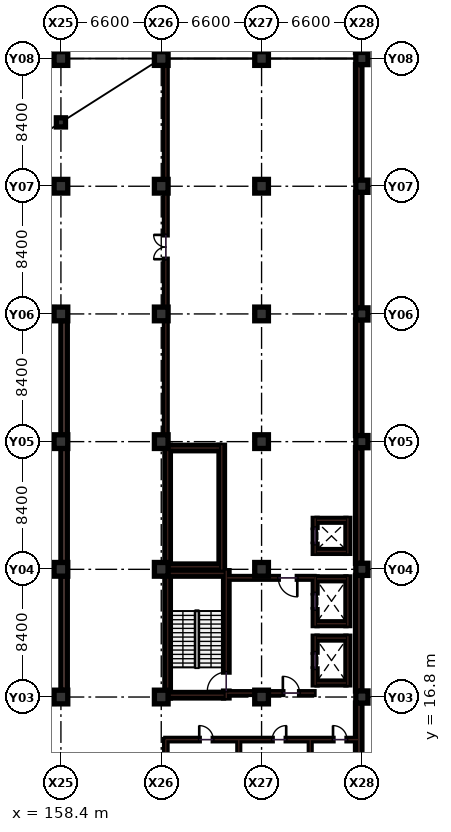
"""IFC4 building model, lengths in metres.
Left out: names, types, materials, properties, quantities, classifications, styles, units other than length and angle.
Written with IfcOpenShell. Run it as: python <this file> out.ifc"""

import sys

from ifc_helpers import new_model, si_unit, direction, frame, frame_2d, origin, origin_2d, place, context, subcontext, project, spatial, rectangle, extrude, element, fill, save


model = new_model("IFC4")
c1 = context("Model", 3, precision=1e-05, world=origin(), true_north=direction((0.0, 1.0)))
c2 = subcontext(c1, "Body", "Model", "MODEL_VIEW")
j1 = project(units=[si_unit("LENGTHUNIT", "METRE"), si_unit("PLANEANGLEUNIT", "RADIAN")], contexts=[c1])
p1 = place(None, origin())
s1 = spatial("IfcSite", under=j1, at=p1, CompositionType="ELEMENT")
p2 = place(p1, origin())
s2 = spatial("IfcBuilding", under=s1, at=p2, CompositionType="ELEMENT")
p3 = place(p2, frame((0.0, 0.0, -4.5)))
s3 = spatial("IfcBuildingStorey", under=s2, at=p3, CompositionType="ELEMENT", Elevation=-4.5)
for number, where, z_axis, x_axis in (
    (1, (158.4, 16.8, 0.0), (0.0, 0.0, 1.0), (1.0, 0.0, 0.0)),
    (2, (158.4, 25.2, 0.0), (0.0, 0.0, 1.0), (1.0, 0.0, 0.0)),
    (3, (158.4, 33.6, 0.0), (0.0, 0.0, 1.0), (1.0, 0.0, 0.0)),
    (4, (158.4, 42.0, 0.0), (0.0, 0.0, 1.0), (1.0, 0.0, 0.0)),
    (5, (158.4, 50.4, 0.0), (0.0, 0.0, 1.0), (1.0, 0.0, 0.0)),
    (6, (158.4, 58.8, 0.0), (0.0, 0.0, 1.0), (1.0, 0.0, 0.0)),
    (7, (165.0, 16.8, 0.0), (0.0, 0.0, 1.0), (1.0, 0.0, 0.0)),
    (8, (165.0, 25.2, 0.0), (0.0, 0.0, 1.0), (1.0, 0.0, 0.0)),
    (9, (165.0, 33.6, 0.0), (0.0, 0.0, 1.0), (1.0, 0.0, 0.0)),
    (10, (165.0, 42.0, 0.0), (0.0, 0.0, 1.0), (1.0, 0.0, 0.0)),
    (11, (165.0, 50.4, 0.0), (0.0, 0.0, 1.0), (1.0, 0.0, 0.0)),
    (12, (165.0, 58.8, 0.0), (0.0, 0.0, 1.0), (1.0, 0.0, 0.0)),
    (13, (171.6, 16.8, 0.0), (0.0, 0.0, 1.0), (1.0, 0.0, 0.0)),
    (14, (171.6, 25.2, 0.0), (0.0, 0.0, 1.0), (1.0, 0.0, 0.0)),
    (15, (171.6, 33.6, 0.0), (0.0, 0.0, 1.0), (1.0, 0.0, 0.0)),
    (16, (171.6, 42.0, 0.0), (0.0, 0.0, 1.0), (1.0, 0.0, 0.0)),
    (17, (171.6, 50.4, 0.0), (0.0, 0.0, 1.0), (1.0, 0.0, 0.0)),
    (18, (171.6, 58.8, 0.0), (0.0, 0.0, 1.0), (1.0, 0.0, 0.0)),
):
    element("IfcColumn", number, at=place(p3, frame(where, z_axis=z_axis, x_axis=x_axis)), inside=s3, PredefinedType="COLUMN", context=c2, shape_type="SweptSolid", body=[
        extrude(rectangle(XDim=0.9, YDim=0.9, at=origin_2d()), origin(), (0.0, 0.0, 1.0), 4.5),
    ])
for number, where, z_axis, x_axis in (
    (19, (178.2, 16.8, 0.0), (0.0, 0.0, 1.0), (1.0, 0.0, 0.0)),
    (20, (178.2, 25.2, 0.0), (0.0, 0.0, 1.0), (1.0, 0.0, 0.0)),
    (21, (178.2, 33.6, 0.0), (0.0, 0.0, 1.0), (1.0, 0.0, 0.0)),
    (22, (178.2, 42.0, 0.0), (0.0, 0.0, 1.0), (1.0, 0.0, 0.0)),
    (23, (178.2, 50.4, 0.0), (0.0, 0.0, 1.0), (1.0, 0.0, 0.0)),
    (24, (178.2, 58.8, 0.0), (0.0, 0.0, 1.0), (1.0, 0.0, 0.0)),
):
    element("IfcColumn", number, at=place(p3, frame(where, z_axis=z_axis, x_axis=x_axis)), inside=s3, PredefinedType="COLUMN", context=c2, shape_type="SweptSolid", body=[
        extrude(rectangle(XDim=0.8, YDim=0.8, at=origin_2d()), origin(), (0.0, 0.0, 1.0), 4.5),
    ])
p4 = place(p3, frame((158.4, 54.6, 0.0), z_axis=(0.0, 0.0, 1.0), x_axis=(1.0, 0.0, 0.0)))
e25 = element("IfcColumn", 25, at=p4, inside=s3, PredefinedType="COLUMN", context=c2, shape_type="SweptSolid", body=[
    extrude(rectangle(XDim=0.6, YDim=0.6, at=origin_2d()), origin(), (0.0, 0.0, 1.0), 4.5),
])
p5 = place(p3, frame((165.3, 14.0, 0.0), z_axis=(0.0, 0.0, 1.0), x_axis=(1.0, 0.0, 0.0)))
e26 = element("IfcWall", 26, at=p5, inside=s3, PredefinedType="PARTITIONING", context=c2, shape_type="SweptSolid", body=[
    extrude(rectangle(XDim=12.7, YDim=0.16, at=frame_2d((6.35, 0.0))), origin(), (0.0, 0.0, 1.0), 3.29),
])
p6 = place(p5, frame((2.2, 0.0, 0.0)))
e27 = element("IfcOpeningElement", 27, at=p6, cuts=e26, PredefinedType="OPENING", context=c2, shape_type="SweptSolid", body=[
    extrude(rectangle(XDim=0.92, YDim=2.08, at=frame_2d((0.46, 1.04))), frame((0.0, 0.09, 0.0), z_axis=(0.0, -1.0, 0.0), x_axis=(1.0, 0.0, 0.0)), (0.0, 0.0, 1.0), 0.18),
])
p7 = place(p5, frame((7.0, 0.0, 0.0)))
e28 = element("IfcOpeningElement", 28, at=p7, cuts=e26, PredefinedType="OPENING", context=c2, shape_type="SweptSolid", body=[
    extrude(rectangle(XDim=0.92, YDim=2.08, at=frame_2d((0.46, 1.04))), frame((0.0, 0.09, 0.0), z_axis=(0.0, -1.0, 0.0), x_axis=(1.0, 0.0, 0.0)), (0.0, 0.0, 1.0), 0.18),
])
p8 = place(p5, frame((11.0, 0.0, 0.0)))
e29 = element("IfcOpeningElement", 29, at=p8, cuts=e26, PredefinedType="OPENING", context=c2, shape_type="SweptSolid", body=[
    extrude(rectangle(XDim=0.92, YDim=2.08, at=frame_2d((0.46, 1.04))), frame((0.0, 0.09, 0.0), z_axis=(0.0, -1.0, 0.0), x_axis=(1.0, 0.0, 0.0)), (0.0, 0.0, 1.0), 0.18),
])
p9 = place(p3, frame((165.3, 9.0, 0.0), z_axis=(0.0, 0.0, 1.0), x_axis=(0.0, 1.0, 0.0)))
e30 = element("IfcWall", 30, at=p9, inside=s3, PredefinedType="PARTITIONING", context=c2, shape_type="SweptSolid", body=[
    extrude(rectangle(XDim=5.0, YDim=0.16, at=frame_2d((2.5, 0.0))), origin(), (0.0, 0.0, 1.0), 3.29),
])
for number, where, z_axis, x_axis in (
    (31, (170.1, 9.0, 0.0), (0.0, 0.0, 1.0), (0.0, 1.0, 0.0)),
    (32, (174.8, 9.0, 0.0), (0.0, 0.0, 1.0), (0.0, 1.0, 0.0)),
):
    element("IfcWall", number, at=place(p3, frame(where, z_axis=z_axis, x_axis=x_axis)), inside=s3, PredefinedType="PARTITIONING", context=c2, shape_type="SweptSolid", body=[
        extrude(rectangle(XDim=5.0, YDim=0.12, at=frame_2d((2.5, 0.0))), origin(), (0.0, 0.0, 1.0), 3.29),
    ])
p10 = place(p3, frame((165.3, 33.6, 0.0), z_axis=(0.0, 0.0, 1.0), x_axis=(0.0, 1.0, 0.0)))
e33 = element("IfcWall", 33, at=p10, inside=s3, PredefinedType="SOLIDWALL", context=c2, shape_type="SweptSolid", body=[
    extrude(rectangle(XDim=7.95, YDim=0.18, at=frame_2d((3.975, 0.0))), origin(), (0.0, 0.0, 1.0), 3.29),
])
p11 = place(p3, frame((165.3, 42.45, 0.0), z_axis=(0.0, 0.0, 1.0), x_axis=(0.0, 1.0, 0.0)))
e34 = element("IfcWall", 34, at=p11, inside=s3, PredefinedType="SOLIDWALL", context=c2, shape_type="SweptSolid", body=[
    extrude(rectangle(XDim=7.5, YDim=0.18, at=frame_2d((3.75, 0.0))), origin(), (0.0, 0.0, 1.0), 3.29),
])
p12 = place(p11, frame((3.15, 0.0, 0.0)))
e35 = element("IfcOpeningElement", 35, at=p12, cuts=e34, PredefinedType="OPENING", context=c2, shape_type="SweptSolid", body=[
    extrude(rectangle(XDim=1.6, YDim=2.2, at=frame_2d((0.8, 1.1))), frame((0.0, 0.1, 0.0), z_axis=(0.0, -1.0, 0.0), x_axis=(1.0, 0.0, 0.0)), (0.0, 0.0, 1.0), 0.2),
])
p13 = place(p3, frame((165.3, 50.85, 0.0), z_axis=(0.0, 0.0, 1.0), x_axis=(0.0, 1.0, 0.0)))
e36 = element("IfcWall", 36, at=p13, inside=s3, PredefinedType="SOLIDWALL", context=c2, shape_type="SweptSolid", body=[
    extrude(rectangle(XDim=7.65, YDim=0.18, at=frame_2d((3.825, 0.0))), origin(), (0.0, 0.0, 1.0), 3.29),
])
for number, where, z_axis, x_axis in (
    (37, (157.955, 16.59, 0.0), (0.0, 0.0, 1.0), (-1.0, 0.0, 0.0)),
    (38, (152.195, 42.21, 0.0), (0.0, 0.0, 1.0), (1.0, 0.0, 0.0)),
):
    element("IfcWall", number, at=place(p3, frame(where, z_axis=z_axis, x_axis=x_axis)), inside=s3, PredefinedType="SOLIDWALL", context=c2, shape_type="SweptSolid", body=[
        extrude(rectangle(XDim=5.76, YDim=0.42, at=frame_2d((2.88, 0.0))), origin(), (0.0, 0.0, 1.0), 4.14),
    ])
p14 = place(p3, frame((158.61, 24.755, 0.0), z_axis=(0.0, 0.0, 1.0), x_axis=(0.0, -1.0, 0.0)))
e39 = element("IfcWall", 39, at=p14, inside=s3, PredefinedType="SOLIDWALL", context=c2, shape_type="SweptSolid", body=[
    extrude(rectangle(XDim=7.51, YDim=0.42, at=frame_2d((3.755, 0.0))), origin(), (0.0, 0.0, 1.0), 4.14),
])
for number, where, z_axis, x_axis in (
    (40, (158.61, 33.155, 0.0), (0.0, 0.0, 1.0), (0.0, -1.0, 0.0)),
    (41, (158.61, 41.555, 0.0), (0.0, 0.0, 1.0), (0.0, -1.0, 0.0)),
):
    element("IfcWall", number, at=place(p3, frame(where, z_axis=z_axis, x_axis=x_axis)), inside=s3, PredefinedType="SOLIDWALL", context=c2, shape_type="SweptSolid", body=[
        extrude(rectangle(XDim=7.51, YDim=0.42, at=frame_2d((3.755, 0.0))), origin(), (0.0, 0.0, 1.0), 4.14),
    ])
p15 = place(p3, frame((177.99, 8.795, 0.0), z_axis=(0.0, 0.0, 1.0), x_axis=(0.0, 1.0, 0.0)))
e42 = element("IfcWall", 42, at=p15, inside=s3, PredefinedType="SOLIDWALL", context=c2, shape_type="SweptSolid", body=[
    extrude(rectangle(XDim=7.61, YDim=0.42, at=frame_2d((3.805, 0.0))), origin(), (0.0, 0.0, 1.0), 4.14),
])
p16 = place(p3, frame((177.99, 17.195, 0.0), z_axis=(0.0, 0.0, 1.0), x_axis=(0.0, 1.0, 0.0)))
e43 = element("IfcWall", 43, at=p16, inside=s3, PredefinedType="SOLIDWALL", context=c2, shape_type="SweptSolid", body=[
    extrude(rectangle(XDim=7.61, YDim=0.42, at=frame_2d((3.805, 0.0))), origin(), (0.0, 0.0, 1.0), 4.14),
])
p17 = place(p3, frame((177.99, 25.595, 0.0), z_axis=(0.0, 0.0, 1.0), x_axis=(0.0, 1.0, 0.0)))
e44 = element("IfcWall", 44, at=p17, inside=s3, PredefinedType="SOLIDWALL", context=c2, shape_type="SweptSolid", body=[
    extrude(rectangle(XDim=7.61, YDim=0.42, at=frame_2d((3.805, 0.0))), origin(), (0.0, 0.0, 1.0), 4.14),
])
for number, where, z_axis, x_axis in (
    (45, (177.99, 33.995, 0.0), (0.0, 0.0, 1.0), (0.0, 1.0, 0.0)),
    (46, (177.99, 42.395, 0.0), (0.0, 0.0, 1.0), (0.0, 1.0, 0.0)),
):
    element("IfcWall", number, at=place(p3, frame(where, z_axis=z_axis, x_axis=x_axis)), inside=s3, PredefinedType="SOLIDWALL", context=c2, shape_type="SweptSolid", body=[
        extrude(rectangle(XDim=7.61, YDim=0.42, at=frame_2d((3.805, 0.0))), origin(), (0.0, 0.0, 1.0), 4.14),
    ])
p18 = place(p3, frame((177.99, 50.795, 0.0), z_axis=(0.0, 0.0, 1.0), x_axis=(0.0, 1.0, 0.0)))
e47 = element("IfcWall", 47, at=p18, inside=s3, PredefinedType="SOLIDWALL", context=c2, shape_type="SweptSolid", body=[
    extrude(rectangle(XDim=7.61, YDim=0.42, at=frame_2d((3.805, 0.0))), origin(), (0.0, 0.0, 1.0), 4.14),
])
p19 = place(p3, frame((177.99, 59.195, 0.0), z_axis=(0.0, 0.0, 1.0), x_axis=(0.0, 1.0, 0.0)))
e48 = element("IfcWall", 48, at=p19, inside=s3, PredefinedType="SOLIDWALL", context=c2, shape_type="SweptSolid", body=[
    extrude(rectangle(XDim=7.71, YDim=0.42, at=frame_2d((3.855, 0.0))), origin(), (0.0, 0.0, 1.0), 4.14),
])
p20 = place(p3, frame((165.42, 16.74, 0.0), z_axis=(0.0, 0.0, 1.0), x_axis=(0.0, 1.0, 0.0)))
e49 = element("IfcWall", 49, at=p20, inside=s3, PredefinedType="SHEAR", context=c2, shape_type="SweptSolid", body=[
    extrude(rectangle(XDim=8.37, YDim=0.36, at=frame_2d((4.185, 0.0))), origin(), (0.0, 0.0, 1.0), 4.14),
])
p21 = place(p3, frame((169.28, 16.74, 0.0), z_axis=(0.0, 0.0, 1.0), x_axis=(0.0, 1.0, 0.0)))
e50 = element("IfcWall", 50, at=p21, inside=s3, PredefinedType="SHEAR", context=c2, shape_type="SweptSolid", body=[
    extrude(rectangle(XDim=8.37, YDim=0.36, at=frame_2d((4.185, 0.0))), origin(), (0.0, 0.0, 1.0), 4.14),
])
p22 = place(p21, frame((0.45, 0.0, 0.0)))
e51 = element("IfcOpeningElement", 51, at=p22, cuts=e50, PredefinedType="OPENING", context=c2, shape_type="SweptSolid", body=[
    extrude(rectangle(XDim=1.25, YDim=2.15, at=frame_2d((0.625, 1.075))), frame((0.0, 0.19, 0.0), z_axis=(0.0, -1.0, 0.0), x_axis=(1.0, 0.0, 0.0)), (0.0, 0.0, 1.0), 0.38),
])
for number, where, z_axis, x_axis in (
    (52, (165.6, 24.93, 0.0), (0.0, 0.0, 1.0), (1.0, 0.0, 0.0)),
    (53, (165.6, 16.92, 0.0), (0.0, 0.0, 1.0), (1.0, 0.0, 0.0)),
):
    element("IfcWall", number, at=place(p3, frame(where, z_axis=z_axis, x_axis=x_axis)), inside=s3, PredefinedType="SHEAR", context=c2, shape_type="SweptSolid", body=[
        extrude(rectangle(XDim=3.5, YDim=0.36, at=frame_2d((1.75, 0.0))), origin(), (0.0, 0.0, 1.0), 4.14),
    ])
for number, where, z_axis, x_axis in (
    (54, (165.42, 25.19, 0.0), (0.0, 0.0, 1.0), (0.0, 1.0, 0.0)),
    (55, (168.98, 25.19, 0.0), (0.0, 0.0, 1.0), (0.0, 1.0, 0.0)),
):
    element("IfcWall", number, at=place(p3, frame(where, z_axis=z_axis, x_axis=x_axis)), inside=s3, PredefinedType="SHEAR", context=c2, shape_type="SweptSolid", body=[
        extrude(rectangle(XDim=8.17, YDim=0.36, at=frame_2d((4.085, 0.0))), origin(), (0.0, 0.0, 1.0), 4.14),
    ])
for number, where, z_axis, x_axis in (
    (56, (165.6, 33.18, 0.0), (0.0, 0.0, 1.0), (1.0, 0.0, 0.0)),
    (57, (165.6, 25.37, 0.0), (0.0, 0.0, 1.0), (1.0, 0.0, 0.0)),
):
    element("IfcWall", number, at=place(p3, frame(where, z_axis=z_axis, x_axis=x_axis)), inside=s3, PredefinedType="SHEAR", context=c2, shape_type="SweptSolid", body=[
        extrude(rectangle(XDim=3.2, YDim=0.36, at=frame_2d((1.6, 0.0))), origin(), (0.0, 0.0, 1.0), 4.14),
    ])
p23 = place(p3, frame((175.125, 17.6, 0.0), z_axis=(0.0, 0.0, 1.0), x_axis=(0.0, 1.0, 0.0)))
e58 = element("IfcWall", 58, at=p23, inside=s3, PredefinedType="SHEAR", context=c2, shape_type="SweptSolid", body=[
    extrude(rectangle(XDim=3.2, YDim=0.25, at=frame_2d((1.6, 0.0))), origin(), (0.0, 0.0, 1.0), 4.14),
])
p24 = place(p23, frame((1.05, 0.0, 0.0)))
e59 = element("IfcOpeningElement", 59, at=p24, cuts=e58, PredefinedType="OPENING", context=c2, shape_type="SweptSolid", body=[
    extrude(rectangle(XDim=1.1, YDim=2.15, at=frame_2d((0.55, 1.075))), frame((0.0, 0.135, 0.0), z_axis=(0.0, -1.0, 0.0), x_axis=(1.0, 0.0, 0.0)), (0.0, 0.0, 1.0), 0.27),
])
p25 = place(p3, frame((177.275, 17.6, 0.0), z_axis=(0.0, 0.0, 1.0), x_axis=(0.0, 1.0, 0.0)))
e60 = element("IfcWall", 60, at=p25, inside=s3, PredefinedType="SHEAR", context=c2, shape_type="SweptSolid", body=[
    extrude(rectangle(XDim=3.2, YDim=0.25, at=frame_2d((1.6, 0.0))), origin(), (0.0, 0.0, 1.0), 4.14),
])
for number, where, z_axis, x_axis in (
    (61, (175.25, 17.725, 0.0), (0.0, 0.0, 1.0), (1.0, 0.0, 0.0)),
    (62, (175.25, 20.675, 0.0), (0.0, 0.0, 1.0), (1.0, 0.0, 0.0)),
):
    element("IfcWall", number, at=place(p3, frame(where, z_axis=z_axis, x_axis=x_axis)), inside=s3, PredefinedType="SHEAR", context=c2, shape_type="SweptSolid", body=[
        extrude(rectangle(XDim=1.9, YDim=0.25, at=frame_2d((0.95, 0.0))), origin(), (0.0, 0.0, 1.0), 4.14),
    ])
p26 = place(p3, frame((175.125, 21.5, 0.0), z_axis=(0.0, 0.0, 1.0), x_axis=(0.0, 1.0, 0.0)))
e63 = element("IfcWall", 63, at=p26, inside=s3, PredefinedType="SHEAR", context=c2, shape_type="SweptSolid", body=[
    extrude(rectangle(XDim=3.2, YDim=0.25, at=frame_2d((1.6, 0.0))), origin(), (0.0, 0.0, 1.0), 4.14),
])
p27 = place(p26, frame((1.05, 0.0, 0.0)))
e64 = element("IfcOpeningElement", 64, at=p27, cuts=e63, PredefinedType="OPENING", context=c2, shape_type="SweptSolid", body=[
    extrude(rectangle(XDim=1.1, YDim=2.15, at=frame_2d((0.55, 1.075))), frame((0.0, 0.135, 0.0), z_axis=(0.0, -1.0, 0.0), x_axis=(1.0, 0.0, 0.0)), (0.0, 0.0, 1.0), 0.27),
])
p28 = place(p3, frame((177.275, 21.5, 0.0), z_axis=(0.0, 0.0, 1.0), x_axis=(0.0, 1.0, 0.0)))
e65 = element("IfcWall", 65, at=p28, inside=s3, PredefinedType="SHEAR", context=c2, shape_type="SweptSolid", body=[
    extrude(rectangle(XDim=3.2, YDim=0.25, at=frame_2d((1.6, 0.0))), origin(), (0.0, 0.0, 1.0), 4.14),
])
for number, where, z_axis, x_axis in (
    (66, (175.25, 21.625, 0.0), (0.0, 0.0, 1.0), (1.0, 0.0, 0.0)),
    (67, (175.25, 24.575, 0.0), (0.0, 0.0, 1.0), (1.0, 0.0, 0.0)),
):
    element("IfcWall", number, at=place(p3, frame(where, z_axis=z_axis, x_axis=x_axis)), inside=s3, PredefinedType="SHEAR", context=c2, shape_type="SweptSolid", body=[
        extrude(rectangle(XDim=1.9, YDim=0.25, at=frame_2d((0.95, 0.0))), origin(), (0.0, 0.0, 1.0), 4.14),
    ])
p29 = place(p3, frame((175.125, 26.25, 0.0), z_axis=(0.0, 0.0, 1.0), x_axis=(0.0, 1.0, 0.0)))
e68 = element("IfcWall", 68, at=p29, inside=s3, PredefinedType="SHEAR", context=c2, shape_type="SweptSolid", body=[
    extrude(rectangle(XDim=2.3, YDim=0.25, at=frame_2d((1.15, 0.0))), origin(), (0.0, 0.0, 1.0), 4.14),
])
p30 = place(p29, frame((0.6, 0.0, 0.0)))
e69 = element("IfcOpeningElement", 69, at=p30, cuts=e68, PredefinedType="OPENING", context=c2, shape_type="SweptSolid", body=[
    extrude(rectangle(XDim=1.1, YDim=2.15, at=frame_2d((0.55, 1.075))), frame((0.0, 0.135, 0.0), z_axis=(0.0, -1.0, 0.0), x_axis=(1.0, 0.0, 0.0)), (0.0, 0.0, 1.0), 0.27),
])
p31 = place(p3, frame((177.275, 26.25, 0.0), z_axis=(0.0, 0.0, 1.0), x_axis=(0.0, 1.0, 0.0)))
e70 = element("IfcWall", 70, at=p31, inside=s3, PredefinedType="SHEAR", context=c2, shape_type="SweptSolid", body=[
    extrude(rectangle(XDim=2.3, YDim=0.25, at=frame_2d((1.15, 0.0))), origin(), (0.0, 0.0, 1.0), 4.14),
])
for number, where, z_axis, x_axis in (
    (71, (175.25, 26.375, 0.0), (0.0, 0.0, 1.0), (1.0, 0.0, 0.0)),
    (72, (175.25, 28.425, 0.0), (0.0, 0.0, 1.0), (1.0, 0.0, 0.0)),
):
    element("IfcWall", number, at=place(p3, frame(where, z_axis=z_axis, x_axis=x_axis)), inside=s3, PredefinedType="SHEAR", context=c2, shape_type="SweptSolid", body=[
        extrude(rectangle(XDim=1.9, YDim=0.25, at=frame_2d((0.95, 0.0))), origin(), (0.0, 0.0, 1.0), 4.14),
    ])
p32 = place(p3, frame((169.35, 24.64, 0.0), z_axis=(0.0, 0.0, 1.0), x_axis=(1.0, 0.0, 0.0)))
e73 = element("IfcWall", 73, at=p32, inside=s3, PredefinedType="SOLIDWALL", context=c2, shape_type="SweptSolid", body=[
    extrude(rectangle(XDim=5.7, YDim=0.18, at=frame_2d((2.85, 0.0))), origin(), (0.0, 0.0, 1.0), 4.14),
])
p33 = place(p32, frame((3.35, 0.0, 0.0)))
e74 = element("IfcOpeningElement", 74, at=p33, cuts=e73, PredefinedType="OPENING", context=c2, shape_type="SweptSolid", body=[
    extrude(rectangle(XDim=1.25, YDim=2.15, at=frame_2d((0.625, 1.075))), frame((0.0, 0.1, 0.0), z_axis=(0.0, -1.0, 0.0), x_axis=(1.0, 0.0, 0.0)), (0.0, 0.0, 1.0), 0.2),
])
p34 = place(p3, frame((169.35, 17.06, 0.0), z_axis=(0.0, 0.0, 1.0), x_axis=(1.0, 0.0, 0.0)))
e75 = element("IfcWall", 75, at=p34, inside=s3, PredefinedType="SOLIDWALL", context=c2, shape_type="SweptSolid", body=[
    extrude(rectangle(XDim=5.7, YDim=0.18, at=frame_2d((2.85, 0.0))), origin(), (0.0, 0.0, 1.0), 3.275),
])
p35 = place(p34, frame((3.65, 0.0, 0.0)))
e76 = element("IfcOpeningElement", 76, at=p35, cuts=e75, PredefinedType="OPENING", context=c2, shape_type="SweptSolid", body=[
    extrude(rectangle(XDim=1.1, YDim=2.15, at=frame_2d((0.55, 1.075))), frame((0.0, 0.1, 0.0), z_axis=(0.0, -1.0, 0.0), x_axis=(1.0, 0.0, 0.0)), (0.0, 0.0, 1.0), 0.2),
])
p36 = place(p6, origin())
e77 = element("IfcDoor", 77, at=p36, inside=s3, OperationType="SINGLE_SWING_LEFT", PredefinedType="DOOR", context=c2, shape_type="SweptSolid", body=[
    extrude(rectangle(XDim=0.92, YDim=2.08, at=frame_2d((0.46, 1.04))), frame((0.0, 0.025, 0.0), z_axis=(0.0, -1.0, 0.0), x_axis=(1.0, 0.0, 0.0)), (0.0, 0.0, 1.0), 0.05),
])
fill(e27, e77)
p37 = place(p7, origin())
e78 = element("IfcDoor", 78, at=p37, inside=s3, OperationType="SINGLE_SWING_RIGHT", PredefinedType="DOOR", context=c2, shape_type="SweptSolid", body=[
    extrude(rectangle(XDim=0.92, YDim=2.08, at=frame_2d((0.46, 1.04))), frame((0.0, 0.025, 0.0), z_axis=(0.0, -1.0, 0.0), x_axis=(1.0, 0.0, 0.0)), (0.0, 0.0, 1.0), 0.05),
])
fill(e28, e78)
p38 = place(p8, origin())
e79 = element("IfcDoor", 79, at=p38, inside=s3, OperationType="SINGLE_SWING_LEFT", PredefinedType="DOOR", context=c2, shape_type="SweptSolid", body=[
    extrude(rectangle(XDim=0.92, YDim=2.08, at=frame_2d((0.46, 1.04))), frame((0.0, 0.025, 0.0), z_axis=(0.0, -1.0, 0.0), x_axis=(1.0, 0.0, 0.0)), (0.0, 0.0, 1.0), 0.05),
])
fill(e29, e79)
p39 = place(p12, origin())
e80 = element("IfcDoor", 80, at=p39, inside=s3, OperationType="DOUBLE_DOOR_SINGLE_SWING", PredefinedType="DOOR", context=c2, shape_type="SweptSolid", body=[
    extrude(rectangle(XDim=1.6, YDim=2.2, at=frame_2d((0.8, 1.1))), frame((0.0, 0.025, 0.0), z_axis=(0.0, -1.0, 0.0), x_axis=(1.0, 0.0, 0.0)), (0.0, 0.0, 1.0), 0.05),
])
fill(e35, e80)
p40 = place(p22, origin())
e81 = element("IfcDoor", 81, at=p40, inside=s3, OperationType="SINGLE_SWING_LEFT", PredefinedType="DOOR", context=c2, shape_type="SweptSolid", body=[
    extrude(rectangle(XDim=1.25, YDim=2.15, at=frame_2d((0.625, 1.075))), frame((0.0, 0.025, 0.0), z_axis=(0.0, -1.0, 0.0), x_axis=(1.0, 0.0, 0.0)), (0.0, 0.0, 1.0), 0.05),
])
fill(e51, e81)
p41 = place(p24, origin())
e82 = element("IfcDoor", 82, at=p41, inside=s3, OperationType="SLIDING_TO_LEFT", PredefinedType="DOOR", context=c2, shape_type="SweptSolid", body=[
    extrude(rectangle(XDim=1.1, YDim=2.15, at=frame_2d((0.55, 1.075))), frame((0.0, 0.025, 0.0), z_axis=(0.0, -1.0, 0.0), x_axis=(1.0, 0.0, 0.0)), (0.0, 0.0, 1.0), 0.05),
])
fill(e59, e82)
p42 = place(p27, origin())
e83 = element("IfcDoor", 83, at=p42, inside=s3, OperationType="SLIDING_TO_LEFT", PredefinedType="DOOR", context=c2, shape_type="SweptSolid", body=[
    extrude(rectangle(XDim=1.1, YDim=2.15, at=frame_2d((0.55, 1.075))), frame((0.0, 0.025, 0.0), z_axis=(0.0, -1.0, 0.0), x_axis=(1.0, 0.0, 0.0)), (0.0, 0.0, 1.0), 0.05),
])
fill(e64, e83)
p43 = place(p30, origin())
e84 = element("IfcDoor", 84, at=p43, inside=s3, OperationType="SLIDING_TO_LEFT", PredefinedType="DOOR", context=c2, shape_type="SweptSolid", body=[
    extrude(rectangle(XDim=1.1, YDim=2.15, at=frame_2d((0.55, 1.075))), frame((0.0, 0.025, 0.0), z_axis=(0.0, -1.0, 0.0), x_axis=(1.0, 0.0, 0.0)), (0.0, 0.0, 1.0), 0.05),
])
fill(e69, e84)
p44 = place(p33, frame((1.25, 0.0, 0.0), z_axis=(0.0, 0.0, 1.0), x_axis=(-1.0, 0.0, 0.0)))
e85 = element("IfcDoor", 85, at=p44, inside=s3, OperationType="SINGLE_SWING_RIGHT", PredefinedType="DOOR", context=c2, shape_type="SweptSolid", body=[
    extrude(rectangle(XDim=1.25, YDim=2.15, at=frame_2d((0.625, 1.075))), frame((0.0, 0.025, 0.0), z_axis=(0.0, -1.0, 0.0), x_axis=(1.0, 0.0, 0.0)), (0.0, 0.0, 1.0), 0.05),
])
fill(e74, e85)
p45 = place(p35, origin())
e86 = element("IfcDoor", 86, at=p45, inside=s3, OperationType="SINGLE_SWING_LEFT", PredefinedType="DOOR", context=c2, shape_type="SweptSolid", body=[
    extrude(rectangle(XDim=1.1, YDim=2.15, at=frame_2d((0.55, 1.075))), frame((0.0, 0.025, 0.0), z_axis=(0.0, -1.0, 0.0), x_axis=(1.0, 0.0, 0.0)), (0.0, 0.0, 1.0), 0.05),
])
fill(e76, e86)
save(model, sys.argv[1])
